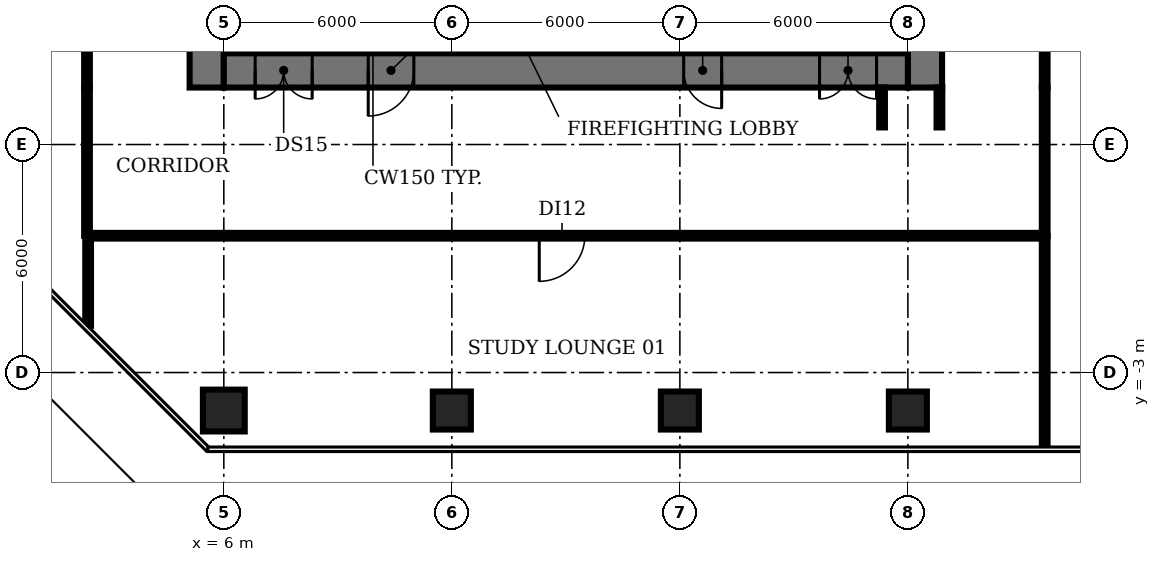
"""IFC4 building model, lengths in metres.
Left out: names, types, materials, properties, quantities, classifications, styles, units other than length and angle.
Written with IfcOpenShell. Run it as: python <this file> out.ifc"""

import sys

from ifc_helpers import new_model, si_unit, direction, frame, frame_2d, origin, origin_2d, place, context, subcontext, project, spatial, rectangle, circle, extrude, element, fill, save


model = new_model("IFC4")
c1 = context("Model", 3, precision=1e-05, world=origin(), true_north=direction((0.0, 1.0)))
c2 = subcontext(c1, "Body", "Model", "MODEL_VIEW")
j1 = project(units=[si_unit("LENGTHUNIT", "METRE"), si_unit("PLANEANGLEUNIT", "RADIAN")], contexts=[c1])
p1 = place(None, origin())
s1 = spatial("IfcSite", under=j1, at=p1, CompositionType="ELEMENT")
p2 = place(p1, origin())
s2 = spatial("IfcBuilding", under=s1, at=p2, CompositionType="ELEMENT")
p3 = place(p2, frame((0.0, 0.0, 11.0)))
s3 = spatial("IfcBuildingStorey", under=s2, at=p3, CompositionType="ELEMENT", Elevation=11.0)
p4 = place(p3, frame((6.0, -4.0, 0.0), z_axis=(0.0, 0.0, 1.0), x_axis=(1.0, 0.0, 0.0)))
e1 = element("IfcColumn", 1, at=p4, inside=s3, PredefinedType="COLUMN", context=c2, shape_type="SweptSolid", body=[
    extrude(circle(Radius=0.55, at=origin_2d()), origin(), (0.0, 0.0, 1.0), 4.15),
])
for number, where, z_axis, x_axis in (
    (2, (12.0, -4.0, 0.0), (0.0, 0.0, 1.0), (1.0, 0.0, 0.0)),
    (3, (18.0, -4.0, 0.0), (0.0, 0.0, 1.0), (1.0, 0.0, 0.0)),
    (4, (24.0, -4.0, 0.0), (0.0, 0.0, 1.0), (1.0, 0.0, 0.0)),
):
    element("IfcColumn", number, at=place(p3, frame(where, z_axis=z_axis, x_axis=x_axis)), inside=s3, PredefinedType="COLUMN", context=c2, shape_type="SweptSolid", body=[
        extrude(rectangle(XDim=1.0, YDim=1.0, at=origin_2d()), origin(), (0.0, 0.0, 1.0), 4.15),
    ])
p5 = place(p3, frame((9.275, 11.825, 0.0), z_axis=(0.0, 0.0, 1.0), x_axis=(0.0, -1.0, 0.0)))
e5 = element("IfcWall", 5, at=p5, inside=s3, PredefinedType="SHEAR", context=c2, shape_type="SweptSolid", body=[
    extrude(rectangle(XDim=6.425, YDim=0.25, at=frame_2d((3.212, 0.0))), origin(), (0.0, 0.0, 1.0), 4.15),
])
p6 = place(p5, frame((5.075, 0.0, 0.0)))
e6 = element("IfcOpeningElement", 6, at=p6, cuts=e5, PredefinedType="OPENING", context=c2, shape_type="SweptSolid", body=[
    extrude(rectangle(XDim=1.0, YDim=2.1, at=frame_2d((0.5, 1.05))), frame((0.0, 0.135, 0.0), z_axis=(0.0, -1.0, 0.0), x_axis=(1.0, 0.0, 0.0)), (0.0, 0.0, 1.0), 0.27),
])
p7 = place(p3, frame((13.5, 5.4, 0.0), z_axis=(0.0, 0.0, 1.0), x_axis=(0.0, 1.0, 0.0)))
e7 = element("IfcWall", 7, at=p7, inside=s3, PredefinedType="SHEAR", context=c2, shape_type="SweptSolid", body=[
    extrude(rectangle(XDim=8.2, YDim=0.2, at=frame_2d((4.1, 0.0))), origin(), (0.0, 0.0, 1.0), 4.15),
])
p8 = place(p7, frame((0.75, 0.0, 0.0)))
e8 = element("IfcOpeningElement", 8, at=p8, cuts=e7, PredefinedType="OPENING", context=c2, shape_type="SweptSolid", body=[
    extrude(rectangle(XDim=1.1, YDim=2.1, at=frame_2d((0.55, 1.05))), frame((0.0, 0.11, 0.0), z_axis=(0.0, -1.0, 0.0), x_axis=(1.0, 0.0, 0.0)), (0.0, 0.0, 1.0), 0.22),
])
p9 = place(p7, frame((3.55, 0.0, 0.0)))
e9 = element("IfcOpeningElement", 9, at=p9, cuts=e7, PredefinedType="OPENING", context=c2, shape_type="SweptSolid", body=[
    extrude(rectangle(XDim=1.1, YDim=2.1, at=frame_2d((0.55, 1.05))), frame((0.0, 0.11, 0.0), z_axis=(0.0, -1.0, 0.0), x_axis=(1.0, 0.0, 0.0)), (0.0, 0.0, 1.0), 0.22),
])
p10 = place(p7, frame((6.35, 0.0, 0.0)))
e10 = element("IfcOpeningElement", 10, at=p10, cuts=e7, PredefinedType="OPENING", context=c2, shape_type="SweptSolid", body=[
    extrude(rectangle(XDim=1.1, YDim=2.1, at=frame_2d((0.55, 1.05))), frame((0.0, 0.11, 0.0), z_axis=(0.0, -1.0, 0.0), x_axis=(1.0, 0.0, 0.0)), (0.0, 0.0, 1.0), 0.22),
])
p11 = place(p3, frame((16.5, 5.4, 0.0), z_axis=(0.0, 0.0, 1.0), x_axis=(0.0, 1.0, 0.0)))
e11 = element("IfcWall", 11, at=p11, inside=s3, PredefinedType="SHEAR", context=c2, shape_type="SweptSolid", body=[
    extrude(rectangle(XDim=8.2, YDim=0.2, at=frame_2d((4.1, 0.0))), origin(), (0.0, 0.0, 1.0), 4.15),
])
p12 = place(p3, frame((20.725, 5.4, 0.0), z_axis=(0.0, 0.0, 1.0), x_axis=(0.0, 1.0, 0.0)))
e12 = element("IfcWall", 12, at=p12, inside=s3, PredefinedType="SHEAR", context=c2, shape_type="SweptSolid", body=[
    extrude(rectangle(XDim=6.3, YDim=0.25, at=frame_2d((3.15, 0.0))), origin(), (0.0, 0.0, 1.0), 4.15),
])
p13 = place(p3, frame((5.55, 4.5, 0.0), z_axis=(0.0, 0.0, 1.0), x_axis=(0.0, 1.0, 0.0)))
e13 = element("IfcWall", 13, at=p13, inside=s3, PredefinedType="SHEAR", context=c2, shape_type="SweptSolid", body=[
    extrude(rectangle(XDim=21.2, YDim=0.9, at=frame_2d((10.6, 0.0))), origin(), (0.0, 0.0, 1.0), 4.15),
])
p14 = place(p13, frame((7.6, 0.0, 0.0)))
e14 = element("IfcOpeningElement", 14, at=p14, cuts=e13, PredefinedType="OPENING", context=c2, shape_type="SweptSolid", body=[
    extrude(rectangle(XDim=1.2, YDim=2.1, at=frame_2d((0.6, 1.05))), frame((0.0, 0.46, 0.0), z_axis=(0.0, -1.0, 0.0), x_axis=(1.0, 0.0, 0.0)), (0.0, 0.0, 1.0), 0.92),
])
p15 = place(p13, frame((14.15, 0.0, 0.0)))
e15 = element("IfcOpeningElement", 15, at=p15, cuts=e13, PredefinedType="OPENING", context=c2, shape_type="SweptSolid", body=[
    extrude(rectangle(XDim=1.2, YDim=2.1, at=frame_2d((0.6, 1.05))), frame((0.0, 0.46, 0.0), z_axis=(0.0, -1.0, 0.0), x_axis=(1.0, 0.0, 0.0)), (0.0, 0.0, 1.0), 0.92),
])
p16 = place(p3, frame((24.45, 25.7, 0.0), z_axis=(0.0, 0.0, 1.0), x_axis=(0.0, -1.0, 0.0)))
e16 = element("IfcWall", 16, at=p16, inside=s3, PredefinedType="SHEAR", context=c2, shape_type="SweptSolid", body=[
    extrude(rectangle(XDim=21.2, YDim=0.9, at=frame_2d((10.6, 0.0))), origin(), (0.0, 0.0, 1.0), 4.15),
])
p17 = place(p16, frame((12.45, 0.0, 0.0)))
e17 = element("IfcOpeningElement", 17, at=p17, cuts=e16, PredefinedType="OPENING", context=c2, shape_type="SweptSolid", body=[
    extrude(rectangle(XDim=0.9, YDim=2.1, at=frame_2d((0.45, 1.05))), frame((0.0, 0.46, 0.0), z_axis=(0.0, -1.0, 0.0), x_axis=(1.0, 0.0, 0.0)), (0.0, 0.0, 1.0), 0.92),
])
p18 = place(p16, frame((6.45, 0.0, 0.0)))
e18 = element("IfcOpeningElement", 18, at=p18, cuts=e16, PredefinedType="OPENING", context=c2, shape_type="SweptSolid", body=[
    extrude(rectangle(XDim=2.0, YDim=2.1, at=frame_2d((1.0, 1.05))), frame((0.0, 0.46, 0.0), z_axis=(0.0, -1.0, 0.0), x_axis=(1.0, 0.0, 0.0)), (0.0, 0.0, 1.0), 0.92),
])
p19 = place(p3, frame((24.0, 4.95, 0.0), z_axis=(0.0, 0.0, 1.0), x_axis=(-1.0, 0.0, 0.0)))
e19 = element("IfcWall", 19, at=p19, inside=s3, PredefinedType="SHEAR", context=c2, shape_type="SweptSolid", body=[
    extrude(rectangle(XDim=18.0, YDim=0.9, at=frame_2d((9.0, 0.0))), origin(), (0.0, 0.0, 1.0), 4.15),
])
p20 = place(p19, frame((15.675, 0.0, 0.0)))
e20 = element("IfcOpeningElement", 20, at=p20, cuts=e19, PredefinedType="OPENING", context=c2, shape_type="SweptSolid", body=[
    extrude(rectangle(XDim=1.5, YDim=2.1, at=frame_2d((0.75, 1.05))), frame((0.0, 0.46, 0.0), z_axis=(0.0, -1.0, 0.0), x_axis=(1.0, 0.0, 0.0)), (0.0, 0.0, 1.0), 0.92),
])
p21 = place(p19, frame((0.825, 0.0, 0.0)))
e21 = element("IfcOpeningElement", 21, at=p21, cuts=e19, PredefinedType="OPENING", context=c2, shape_type="SweptSolid", body=[
    extrude(rectangle(XDim=1.5, YDim=2.1, at=frame_2d((0.75, 1.05))), frame((0.0, 0.46, 0.0), z_axis=(0.0, -1.0, 0.0), x_axis=(1.0, 0.0, 0.0)), (0.0, 0.0, 1.0), 0.92),
])
p22 = place(p19, frame((13.0, 0.0, 0.0)))
e22 = element("IfcOpeningElement", 22, at=p22, cuts=e19, PredefinedType="OPENING", context=c2, shape_type="SweptSolid", body=[
    extrude(rectangle(XDim=1.2, YDim=2.1, at=frame_2d((0.6, 1.05))), frame((0.0, 0.46, 0.0), z_axis=(0.0, -1.0, 0.0), x_axis=(1.0, 0.0, 0.0)), (0.0, 0.0, 1.0), 0.92),
])
p23 = place(p19, frame((4.9, 0.0, 0.0)))
e23 = element("IfcOpeningElement", 23, at=p23, cuts=e19, PredefinedType="OPENING", context=c2, shape_type="SweptSolid", body=[
    extrude(rectangle(XDim=1.0, YDim=2.1, at=frame_2d((0.5, 1.05))), frame((0.0, 0.46, 0.0), z_axis=(0.0, -1.0, 0.0), x_axis=(1.0, 0.0, 0.0)), (0.0, 0.0, 1.0), 0.92),
])
p24 = place(p3, frame((2.4, 0.6, 0.0), z_axis=(0.0, 0.0, 1.0), x_axis=(0.0, 1.0, 0.0)))
e24 = element("IfcWall", 24, at=p24, inside=s3, PredefinedType="PARTITIONING", context=c2, shape_type="SweptSolid", body=[
    extrude(rectangle(XDim=3.9, YDim=0.15, at=frame_2d((1.95, 0.0))), origin(), (0.0, 0.0, 1.0), 3.08),
])
p25 = place(p3, frame((2.4, 4.5, 0.0), z_axis=(0.0, 0.0, 1.0), x_axis=(0.0, 1.0, 0.0)))
e25 = element("IfcWall", 25, at=p25, inside=s3, PredefinedType="PARTITIONING", context=c2, shape_type="SweptSolid", body=[
    extrude(rectangle(XDim=21.2, YDim=0.15, at=frame_2d((10.6, 0.0))), origin(), (0.0, 0.0, 1.0), 3.08),
])
p26 = place(p25, frame((10.8, 0.0, 0.0)))
e26 = element("IfcOpeningElement", 26, at=p26, cuts=e25, PredefinedType="OPENING", context=c2, shape_type="SweptSolid", body=[
    extrude(rectangle(XDim=1.2, YDim=2.1, at=frame_2d((0.6, 1.05))), frame((0.0, 0.085, 0.0), z_axis=(0.0, -1.0, 0.0), x_axis=(1.0, 0.0, 0.0)), (0.0, 0.0, 1.0), 0.17),
])
p27 = place(p3, frame((2.43, -1.77, 0.0), z_axis=(0.0, 0.0, 1.0), x_axis=(0.0, 1.0, 0.0)))
e27 = element("IfcWall", 27, at=p27, inside=s3, PredefinedType="PARTITIONING", context=c2, shape_type="SweptSolid", body=[
    extrude(rectangle(XDim=2.37, YDim=0.15, at=frame_2d((1.185, 0.0))), origin(), (0.0, 0.0, 1.0), 3.08),
])
for number, where, z_axis, x_axis in (
    (28, (23.32, 3.45, 0.0), (0.0, 0.0, 1.0), (0.0, 1.0, 0.0)),
    (29, (24.83, 3.45, 0.0), (0.0, 0.0, 1.0), (0.0, 1.0, 0.0)),
):
    element("IfcWall", number, at=place(p3, frame(where, z_axis=z_axis, x_axis=x_axis)), inside=s3, PredefinedType="PARTITIONING", context=c2, shape_type="SweptSolid", body=[
        extrude(rectangle(XDim=1.05, YDim=0.15, at=frame_2d((0.525, 0.0))), origin(), (0.0, 0.0, 1.0), 3.08),
    ])
p28 = place(p3, frame((27.6, -4.97, 0.0), z_axis=(0.0, 0.0, 1.0), x_axis=(0.0, 1.0, 0.0)))
e30 = element("IfcWall", 30, at=p28, inside=s3, PredefinedType="PARTITIONING", context=c2, shape_type="SweptSolid", body=[
    extrude(rectangle(XDim=5.57, YDim=0.15, at=frame_2d((2.785, 0.0))), origin(), (0.0, 0.0, 1.0), 3.08),
])
p29 = place(p3, frame((27.6, 0.6, 0.0), z_axis=(0.0, 0.0, 1.0), x_axis=(-1.0, 0.0, 0.0)))
e31 = element("IfcWall", 31, at=p29, inside=s3, PredefinedType="PARTITIONING", context=c2, shape_type="SweptSolid", body=[
    extrude(rectangle(XDim=25.2, YDim=0.15, at=frame_2d((12.6, 0.0))), origin(), (0.0, 0.0, 1.0), 3.08),
])
p30 = place(p29, frame((12.1, 0.0, 0.0)))
e32 = element("IfcOpeningElement", 32, at=p30, cuts=e31, PredefinedType="OPENING", context=c2, shape_type="SweptSolid", body=[
    extrude(rectangle(XDim=1.2, YDim=2.1, at=frame_2d((0.6, 1.05))), frame((0.0, 0.085, 0.0), z_axis=(0.0, -1.0, 0.0), x_axis=(1.0, 0.0, 0.0)), (0.0, 0.0, 1.0), 0.17),
])
p31 = place(p3, frame((27.6, 0.6, 0.0), z_axis=(0.0, 0.0, 1.0), x_axis=(0.0, 1.0, 0.0)))
e33 = element("IfcWall", 33, at=p31, inside=s3, PredefinedType="PARTITIONING", context=c2, shape_type="SweptSolid", body=[
    extrude(rectangle(XDim=3.9, YDim=0.15, at=frame_2d((1.95, 0.0))), origin(), (0.0, 0.0, 1.0), 3.08),
])
p32 = place(p3, frame((27.6, 23.77, 0.0), z_axis=(0.0, 0.0, 1.0), x_axis=(0.0, -1.0, 0.0)))
e34 = element("IfcWall", 34, at=p32, inside=s3, PredefinedType="PARTITIONING", context=c2, shape_type="SweptSolid", body=[
    extrude(rectangle(XDim=19.27, YDim=0.15, at=frame_2d((9.635, 0.0))), origin(), (0.0, 0.0, 1.0), 3.08),
])
p33 = place(p32, frame((9.07, 0.0, 0.0)))
e35 = element("IfcOpeningElement", 35, at=p33, cuts=e34, PredefinedType="OPENING", context=c2, shape_type="SweptSolid", body=[
    extrude(rectangle(XDim=1.0, YDim=2.1, at=frame_2d((0.5, 1.05))), frame((0.0, 0.085, 0.0), z_axis=(0.0, -1.0, 0.0), x_axis=(1.0, 0.0, 0.0)), (0.0, 0.0, 1.0), 0.17),
])
p34 = place(p20, origin())
e36 = element("IfcDoor", 36, at=p34, inside=s3, OperationType="DOUBLE_DOOR_SINGLE_SWING", PredefinedType="DOOR", context=c2, shape_type="SweptSolid", body=[
    extrude(rectangle(XDim=1.5, YDim=2.1, at=frame_2d((0.75, 1.05))), frame((0.0, 0.025, 0.0), z_axis=(0.0, -1.0, 0.0), x_axis=(1.0, 0.0, 0.0)), (0.0, 0.0, 1.0), 0.05),
])
fill(e20, e36)
p35 = place(p21, origin())
e37 = element("IfcDoor", 37, at=p35, inside=s3, OperationType="DOUBLE_DOOR_SINGLE_SWING", PredefinedType="DOOR", context=c2, shape_type="SweptSolid", body=[
    extrude(rectangle(XDim=1.5, YDim=2.1, at=frame_2d((0.75, 1.05))), frame((0.0, 0.025, 0.0), z_axis=(0.0, -1.0, 0.0), x_axis=(1.0, 0.0, 0.0)), (0.0, 0.0, 1.0), 0.05),
])
fill(e21, e37)
p36 = place(p22, origin())
e38 = element("IfcDoor", 38, at=p36, inside=s3, OperationType="SINGLE_SWING_RIGHT", PredefinedType="DOOR", context=c2, shape_type="SweptSolid", body=[
    extrude(rectangle(XDim=1.2, YDim=2.1, at=frame_2d((0.6, 1.05))), frame((0.0, 0.025, 0.0), z_axis=(0.0, -1.0, 0.0), x_axis=(1.0, 0.0, 0.0)), (0.0, 0.0, 1.0), 0.05),
])
fill(e22, e38)
p37 = place(p23, origin())
e39 = element("IfcDoor", 39, at=p37, inside=s3, OperationType="SINGLE_SWING_LEFT", PredefinedType="DOOR", context=c2, shape_type="SweptSolid", body=[
    extrude(rectangle(XDim=1.0, YDim=2.1, at=frame_2d((0.5, 1.05))), frame((0.0, -0.39, 0.0), z_axis=(0.0, -1.0, 0.0), x_axis=(1.0, 0.0, 0.0)), (0.0, 0.0, 1.0), 0.05),
])
fill(e23, e39)
p38 = place(p30, origin())
e40 = element("IfcDoor", 40, at=p38, inside=s3, OperationType="SINGLE_SWING_RIGHT", PredefinedType="DOOR", context=c2, shape_type="SweptSolid", body=[
    extrude(rectangle(XDim=1.2, YDim=2.1, at=frame_2d((0.6, 1.05))), frame((0.0, 0.025, 0.0), z_axis=(0.0, -1.0, 0.0), x_axis=(1.0, 0.0, 0.0)), (0.0, 0.0, 1.0), 0.05),
])
fill(e32, e40)
save(model, sys.argv[1])
